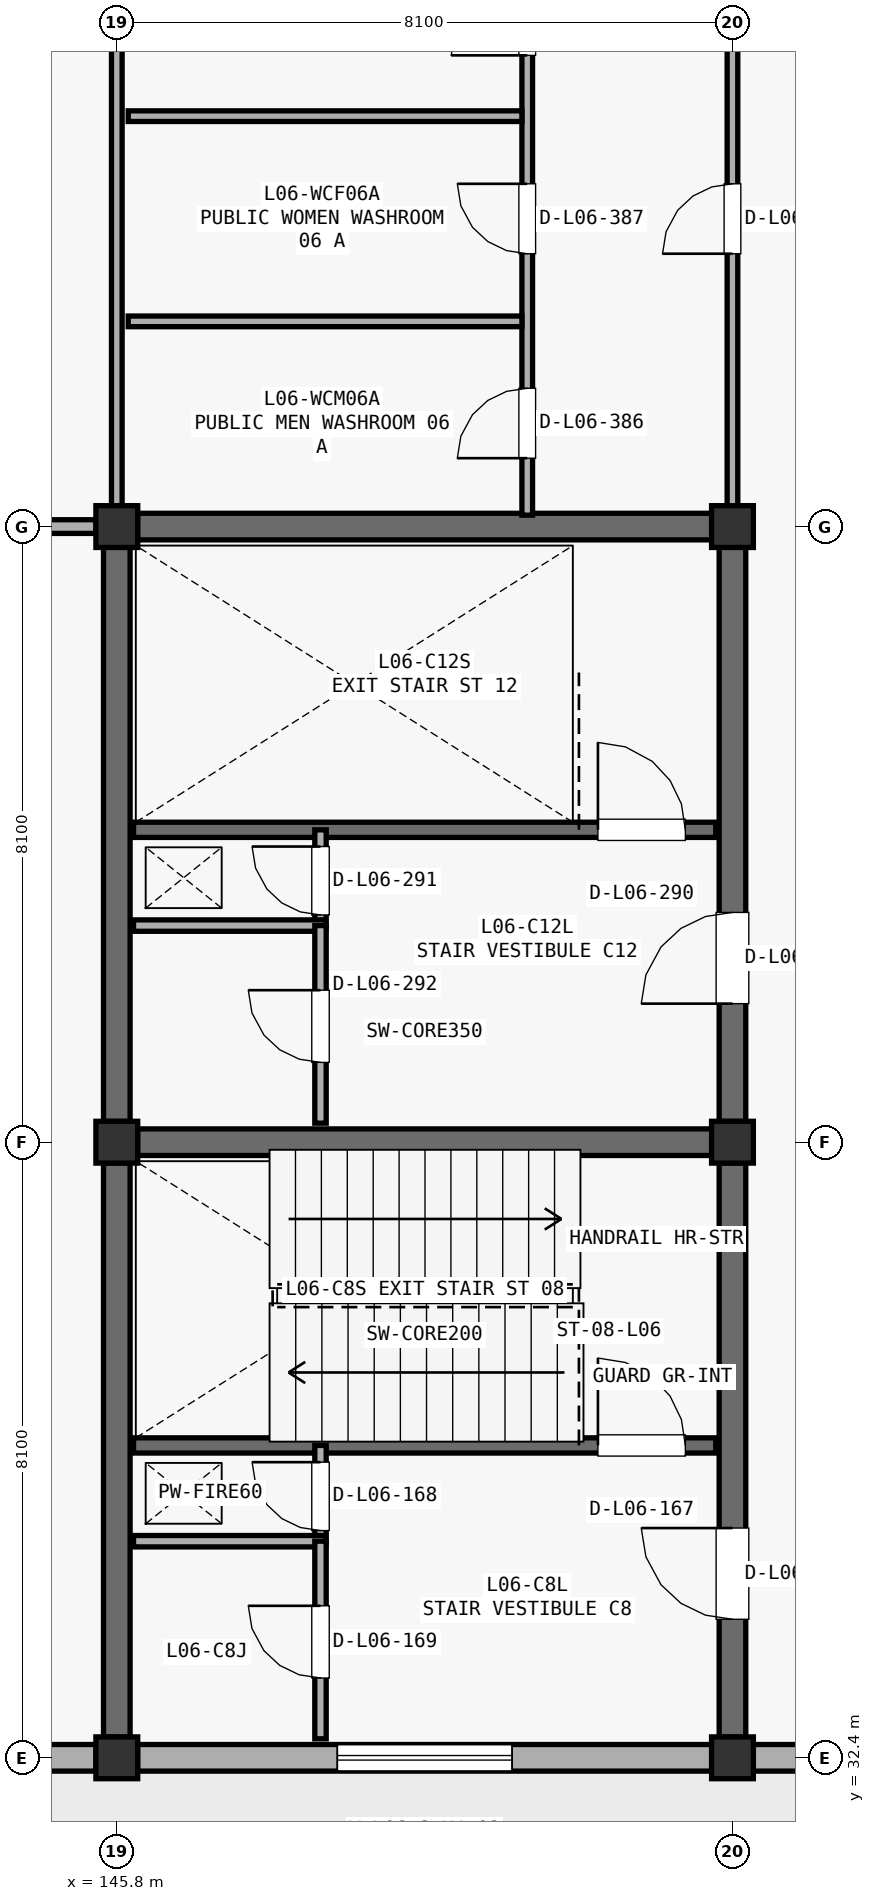
"""IFC4 building model, lengths in metres.
Left out: names, types, materials, properties, quantities, classifications, styles, units other than length and angle.
Written with IfcOpenShell. Run it as: python <this file> out.ifc"""

import sys

from ifc_helpers import new_model, si_unit, direction, frame, frame_2d, origin, origin_2d, place, context, subcontext, project, spatial, rectangle, extrude, element, fill, save


model = new_model("IFC4")
c1 = context("Model", 3, precision=1e-05, world=origin(), true_north=direction((0.0, 1.0)))
c2 = subcontext(c1, "Body", "Model", "MODEL_VIEW")
j1 = project(units=[si_unit("LENGTHUNIT", "METRE"), si_unit("PLANEANGLEUNIT", "RADIAN")], contexts=[c1])
p1 = place(None, origin())
s1 = spatial("IfcSite", under=j1, at=p1, CompositionType="ELEMENT")
p2 = place(p1, origin())
s2 = spatial("IfcBuilding", under=s1, at=p2, CompositionType="ELEMENT")
p3 = place(p2, frame((0.0, 0.0, 27.37)))
s3 = spatial("IfcBuildingStorey", under=s2, at=p3, CompositionType="ELEMENT", Elevation=27.37)
for number, where, z_axis, x_axis in (
    (1, (145.8, 32.4, 0.0), (0.0, 0.0, 1.0), (1.0, 0.0, 0.0)),
    (2, (145.8, 40.5, 0.0), (0.0, 0.0, 1.0), (1.0, 0.0, 0.0)),
    (3, (145.8, 48.6, 0.0), (0.0, 0.0, 1.0), (1.0, 0.0, 0.0)),
    (4, (153.9, 32.4, 0.0), (0.0, 0.0, 1.0), (1.0, 0.0, 0.0)),
    (5, (153.9, 40.5, 0.0), (0.0, 0.0, 1.0), (1.0, 0.0, 0.0)),
    (6, (153.9, 48.6, 0.0), (0.0, 0.0, 1.0), (1.0, 0.0, 0.0)),
):
    element("IfcColumn", number, at=place(p3, frame(where, z_axis=z_axis, x_axis=x_axis)), inside=s3, PredefinedType="COLUMN", context=c2, shape_type="SweptSolid", body=[
        extrude(rectangle(XDim=0.55, YDim=0.55, at=origin_2d()), origin(), (0.0, 0.0, 1.0), 4.42),
    ])
p4 = place(p3, frame((137.973, 32.4, 0.0), z_axis=(0.0, 0.0, 1.0), x_axis=(1.0, 0.0, 0.0)))
e7 = element("IfcWall", 7, at=p4, inside=s3, PredefinedType="STANDARD", context=c2, shape_type="SweptSolid", body=[
    extrude(rectangle(XDim=7.554, YDim=0.35, at=frame_2d((3.777, 0.0))), origin(), (0.0, 0.0, 1.0), 3.512),
])
p5 = place(p4, frame((2.752, 0.0, 0.85)))
e8 = element("IfcOpeningElement", 8, at=p5, cuts=e7, PredefinedType="OPENING", context=c2, shape_type="SweptSolid", body=[
    extrude(rectangle(XDim=2.05, YDim=1.6, at=frame_2d((1.025, 0.8))), frame((0.0, 0.185, 0.0), z_axis=(0.0, -1.0, 0.0), x_axis=(1.0, 0.0, 0.0)), (0.0, 0.0, 1.0), 0.37),
])
p6 = place(p3, frame((146.073, 32.4, 0.0), z_axis=(0.0, 0.0, 1.0), x_axis=(1.0, 0.0, 0.0)))
e9 = element("IfcWall", 9, at=p6, inside=s3, PredefinedType="STANDARD", context=c2, shape_type="SweptSolid", body=[
    extrude(rectangle(XDim=7.554, YDim=0.35, at=frame_2d((3.777, 0.0))), origin(), (0.0, 0.0, 1.0), 3.212),
])
p7 = place(p6, frame((2.627, 0.0, 0.85)))
e10 = element("IfcOpeningElement", 10, at=p7, cuts=e9, PredefinedType="OPENING", context=c2, shape_type="SweptSolid", body=[
    extrude(rectangle(XDim=2.3, YDim=1.6, at=frame_2d((1.15, 0.8))), frame((0.0, 0.185, 0.0), z_axis=(0.0, -1.0, 0.0), x_axis=(1.0, 0.0, 0.0)), (0.0, 0.0, 1.0), 0.37),
])
p8 = place(p3, frame((154.173, 32.4, 0.0), z_axis=(0.0, 0.0, 1.0), x_axis=(1.0, 0.0, 0.0)))
e11 = element("IfcWall", 11, at=p8, inside=s3, PredefinedType="STANDARD", context=c2, shape_type="SweptSolid", body=[
    extrude(rectangle(XDim=7.554, YDim=0.35, at=frame_2d((3.777, 0.0))), origin(), (0.0, 0.0, 1.0), 3.412),
])
p9 = place(p8, frame((4.677, 0.0, 0.0), z_axis=(0.0, 0.0, 1.0), x_axis=(-1.0, 0.0, 0.0)))
e12 = element("IfcOpeningElement", 12, at=p9, cuts=e11, PredefinedType="OPENING", context=c2, shape_type="SweptSolid", body=[
    extrude(rectangle(XDim=1.8, YDim=2.2, at=frame_2d((0.9, 1.1))), frame((0.0, 0.185, 0.0), z_axis=(0.0, -1.0, 0.0), x_axis=(1.0, 0.0, 0.0)), (0.0, 0.0, 1.0), 0.37),
])
for number, where, z_axis, x_axis in (
    (13, (146.073, 40.5, 0.0), (0.0, 0.0, 1.0), (1.0, 0.0, 0.0)),
    (14, (145.8, 32.673, 0.0), (0.0, 0.0, 1.0), (0.0, 1.0, 0.0)),
):
    element("IfcWall", number, at=place(p3, frame(where, z_axis=z_axis, x_axis=x_axis)), inside=s3, PredefinedType="SHEAR", context=c2, shape_type="SweptSolid", body=[
        extrude(rectangle(XDim=7.554, YDim=0.35, at=frame_2d((3.777, 0.0))), origin(), (0.0, 0.0, 1.0), 4.162),
    ])
p10 = place(p3, frame((153.9, 32.673, 0.0), z_axis=(0.0, 0.0, 1.0), x_axis=(0.0, 1.0, 0.0)))
e15 = element("IfcWall", 15, at=p10, inside=s3, PredefinedType="SHEAR", context=c2, shape_type="SweptSolid", body=[
    extrude(rectangle(XDim=7.554, YDim=0.35, at=frame_2d((3.777, 0.0))), origin(), (0.0, 0.0, 1.0), 4.162),
])
p11 = place(p10, frame((1.55, 0.0, 0.0)))
e16 = element("IfcOpeningElement", 16, at=p11, cuts=e15, PredefinedType="OPENING", context=c2, shape_type="SweptSolid", body=[
    extrude(rectangle(XDim=1.2, YDim=2.2, at=frame_2d((0.6, 1.1))), frame((0.0, 0.185, 0.0), z_axis=(0.0, -1.0, 0.0), x_axis=(1.0, 0.0, 0.0)), (0.0, 0.0, 1.0), 0.37),
])
p12 = place(p3, frame((146.02, 36.51, 0.0), z_axis=(0.0, 0.0, 1.0), x_axis=(1.0, 0.0, 0.0)))
e17 = element("IfcWall", 17, at=p12, inside=s3, PredefinedType="SHEAR", context=c2, shape_type="SweptSolid", body=[
    extrude(rectangle(XDim=7.66, YDim=0.2, at=frame_2d((3.83, 0.0))), origin(), (0.0, 0.0, 1.0), 4.162),
])
p13 = place(p12, frame((6.11, 0.0, 0.0)))
e18 = element("IfcOpeningElement", 18, at=p13, cuts=e17, PredefinedType="OPENING", context=c2, shape_type="SweptSolid", body=[
    extrude(rectangle(XDim=1.15, YDim=2.2, at=frame_2d((0.575, 1.1))), frame((0.0, 0.11, 0.0), z_axis=(0.0, -1.0, 0.0), x_axis=(1.0, 0.0, 0.0)), (0.0, 0.0, 1.0), 0.22),
])
p14 = place(p3, frame((148.48, 35.25, 0.0), z_axis=(0.0, 0.0, 1.0), x_axis=(0.0, 1.0, 0.0)))
e19 = element("IfcWall", 19, at=p14, inside=s3, PredefinedType="PARTITIONING", context=c2, shape_type="SweptSolid", body=[
    extrude(rectangle(XDim=1.26, YDim=0.15, at=frame_2d((0.63, 0.0))), origin(), (0.0, 0.0, 1.0), 4.162),
])
p15 = place(p14, frame((0.14, 0.0, 0.0)))
e20 = element("IfcOpeningElement", 20, at=p15, cuts=e19, PredefinedType="OPENING", context=c2, shape_type="SweptSolid", body=[
    extrude(rectangle(XDim=0.9, YDim=2.15, at=frame_2d((0.45, 1.075))), frame((0.0, 0.085, 0.0), z_axis=(0.0, -1.0, 0.0), x_axis=(1.0, 0.0, 0.0)), (0.0, 0.0, 1.0), 0.17),
])
p16 = place(p3, frame((146.02, 35.25, 0.0), z_axis=(0.0, 0.0, 1.0), x_axis=(1.0, 0.0, 0.0)))
e21 = element("IfcWall", 21, at=p16, inside=s3, PredefinedType="PARTITIONING", context=c2, shape_type="SweptSolid", body=[
    extrude(rectangle(XDim=2.53, YDim=0.15, at=frame_2d((1.265, 0.0))), origin(), (0.0, 0.0, 1.0), 4.162),
])
p17 = place(p3, frame((148.48, 32.65, 0.0), z_axis=(0.0, 0.0, 1.0), x_axis=(0.0, 1.0, 0.0)))
e22 = element("IfcWall", 22, at=p17, inside=s3, PredefinedType="PARTITIONING", context=c2, shape_type="SweptSolid", body=[
    extrude(rectangle(XDim=2.6, YDim=0.15, at=frame_2d((1.3, 0.0))), origin(), (0.0, 0.0, 1.0), 4.162),
])
p18 = place(p17, frame((0.8, 0.0, 0.0)))
e23 = element("IfcOpeningElement", 23, at=p18, cuts=e22, PredefinedType="OPENING", context=c2, shape_type="SweptSolid", body=[
    extrude(rectangle(XDim=0.95, YDim=2.15, at=frame_2d((0.475, 1.075))), frame((0.0, 0.085, 0.0), z_axis=(0.0, -1.0, 0.0), x_axis=(1.0, 0.0, 0.0)), (0.0, 0.0, 1.0), 0.17),
])
for number, where, z_axis, x_axis in (
    (24, (146.073, 48.6, 0.0), (0.0, 0.0, 1.0), (1.0, 0.0, 0.0)),
    (25, (145.8, 40.773, 0.0), (0.0, 0.0, 1.0), (0.0, 1.0, 0.0)),
):
    element("IfcWall", number, at=place(p3, frame(where, z_axis=z_axis, x_axis=x_axis)), inside=s3, PredefinedType="SHEAR", context=c2, shape_type="SweptSolid", body=[
        extrude(rectangle(XDim=7.554, YDim=0.35, at=frame_2d((3.777, 0.0))), origin(), (0.0, 0.0, 1.0), 4.162),
    ])
p19 = place(p3, frame((153.9, 40.773, 0.0), z_axis=(0.0, 0.0, 1.0), x_axis=(0.0, 1.0, 0.0)))
e26 = element("IfcWall", 26, at=p19, inside=s3, PredefinedType="SHEAR", context=c2, shape_type="SweptSolid", body=[
    extrude(rectangle(XDim=7.554, YDim=0.35, at=frame_2d((3.777, 0.0))), origin(), (0.0, 0.0, 1.0), 4.162),
])
p20 = place(p19, frame((1.55, 0.0, 0.0)))
e27 = element("IfcOpeningElement", 27, at=p20, cuts=e26, PredefinedType="OPENING", context=c2, shape_type="SweptSolid", body=[
    extrude(rectangle(XDim=1.2, YDim=2.2, at=frame_2d((0.6, 1.1))), frame((0.0, 0.185, 0.0), z_axis=(0.0, -1.0, 0.0), x_axis=(1.0, 0.0, 0.0)), (0.0, 0.0, 1.0), 0.37),
])
p21 = place(p3, frame((146.02, 44.61, 0.0), z_axis=(0.0, 0.0, 1.0), x_axis=(1.0, 0.0, 0.0)))
e28 = element("IfcWall", 28, at=p21, inside=s3, PredefinedType="SHEAR", context=c2, shape_type="SweptSolid", body=[
    extrude(rectangle(XDim=7.66, YDim=0.2, at=frame_2d((3.83, 0.0))), origin(), (0.0, 0.0, 1.0), 4.162),
])
p22 = place(p21, frame((6.11, 0.0, 0.0)))
e29 = element("IfcOpeningElement", 29, at=p22, cuts=e28, PredefinedType="OPENING", context=c2, shape_type="SweptSolid", body=[
    extrude(rectangle(XDim=1.15, YDim=2.2, at=frame_2d((0.575, 1.1))), frame((0.0, 0.11, 0.0), z_axis=(0.0, -1.0, 0.0), x_axis=(1.0, 0.0, 0.0)), (0.0, 0.0, 1.0), 0.22),
])
p23 = place(p3, frame((148.48, 43.35, 0.0), z_axis=(0.0, 0.0, 1.0), x_axis=(0.0, 1.0, 0.0)))
e30 = element("IfcWall", 30, at=p23, inside=s3, PredefinedType="PARTITIONING", context=c2, shape_type="SweptSolid", body=[
    extrude(rectangle(XDim=1.26, YDim=0.15, at=frame_2d((0.63, 0.0))), origin(), (0.0, 0.0, 1.0), 4.162),
])
p24 = place(p23, frame((0.14, 0.0, 0.0)))
e31 = element("IfcOpeningElement", 31, at=p24, cuts=e30, PredefinedType="OPENING", context=c2, shape_type="SweptSolid", body=[
    extrude(rectangle(XDim=0.9, YDim=2.15, at=frame_2d((0.45, 1.075))), frame((0.0, 0.085, 0.0), z_axis=(0.0, -1.0, 0.0), x_axis=(1.0, 0.0, 0.0)), (0.0, 0.0, 1.0), 0.17),
])
p25 = place(p3, frame((146.02, 43.35, 0.0), z_axis=(0.0, 0.0, 1.0), x_axis=(1.0, 0.0, 0.0)))
e32 = element("IfcWall", 32, at=p25, inside=s3, PredefinedType="PARTITIONING", context=c2, shape_type="SweptSolid", body=[
    extrude(rectangle(XDim=2.53, YDim=0.15, at=frame_2d((1.265, 0.0))), origin(), (0.0, 0.0, 1.0), 4.162),
])
p26 = place(p3, frame((148.48, 40.75, 0.0), z_axis=(0.0, 0.0, 1.0), x_axis=(0.0, 1.0, 0.0)))
e33 = element("IfcWall", 33, at=p26, inside=s3, PredefinedType="PARTITIONING", context=c2, shape_type="SweptSolid", body=[
    extrude(rectangle(XDim=2.6, YDim=0.15, at=frame_2d((1.3, 0.0))), origin(), (0.0, 0.0, 1.0), 4.162),
])
p27 = place(p26, frame((0.8, 0.0, 0.0)))
e34 = element("IfcOpeningElement", 34, at=p27, cuts=e33, PredefinedType="OPENING", context=c2, shape_type="SweptSolid", body=[
    extrude(rectangle(XDim=0.95, YDim=2.15, at=frame_2d((0.475, 1.075))), frame((0.0, 0.085, 0.0), z_axis=(0.0, -1.0, 0.0), x_axis=(1.0, 0.0, 0.0)), (0.0, 0.0, 1.0), 0.17),
])
p28 = place(p3, frame((145.8, 48.873, 0.0), z_axis=(0.0, 0.0, 1.0), x_axis=(0.0, 1.0, 0.0)))
e35 = element("IfcWall", 35, at=p28, inside=s3, PredefinedType="PARTITIONING", context=c2, shape_type="SweptSolid", body=[
    extrude(rectangle(XDim=7.554, YDim=0.14, at=frame_2d((3.777, 0.0))), origin(), (0.0, 0.0, 1.0), 3.21),
])
p29 = place(p3, frame((153.9, 48.873, 0.0), z_axis=(0.0, 0.0, 1.0), x_axis=(0.0, 1.0, 0.0)))
e36 = element("IfcWall", 36, at=p29, inside=s3, PredefinedType="PARTITIONING", context=c2, shape_type="SweptSolid", body=[
    extrude(rectangle(XDim=7.554, YDim=0.14, at=frame_2d((3.777, 0.0))), origin(), (0.0, 0.0, 1.0), 3.51),
])
p30 = place(p29, frame((3.317, 0.0, 0.0)))
e37 = element("IfcOpeningElement", 37, at=p30, cuts=e36, PredefinedType="OPENING", context=c2, shape_type="SweptSolid", body=[
    extrude(rectangle(XDim=0.92, YDim=2.15, at=frame_2d((0.46, 1.075))), frame((0.0, 0.08, 0.0), z_axis=(0.0, -1.0, 0.0), x_axis=(1.0, 0.0, 0.0)), (0.0, 0.0, 1.0), 0.16),
])
p31 = place(p3, frame((151.2, 48.75, 0.0), z_axis=(0.0, 0.0, 1.0), x_axis=(0.0, 1.0, 0.0)))
e38 = element("IfcWall", 38, at=p31, inside=s3, PredefinedType="PARTITIONING", context=c2, shape_type="SweptSolid", body=[
    extrude(rectangle(XDim=7.8, YDim=0.14, at=frame_2d((3.9, 0.0))), origin(), (0.0, 0.0, 1.0), 4.162),
])
p32 = place(p31, frame((0.75, 0.0, 0.0)))
e39 = element("IfcOpeningElement", 39, at=p32, cuts=e38, PredefinedType="OPENING", context=c2, shape_type="SweptSolid", body=[
    extrude(rectangle(XDim=0.92, YDim=2.15, at=frame_2d((0.46, 1.075))), frame((0.0, 0.08, 0.0), z_axis=(0.0, -1.0, 0.0), x_axis=(1.0, 0.0, 0.0)), (0.0, 0.0, 1.0), 0.16),
])
p33 = place(p31, frame((3.44, 0.0, 0.0)))
e40 = element("IfcOpeningElement", 40, at=p33, cuts=e38, PredefinedType="OPENING", context=c2, shape_type="SweptSolid", body=[
    extrude(rectangle(XDim=0.92, YDim=2.15, at=frame_2d((0.46, 1.075))), frame((0.0, 0.08, 0.0), z_axis=(0.0, -1.0, 0.0), x_axis=(1.0, 0.0, 0.0)), (0.0, 0.0, 1.0), 0.16),
])
p34 = place(p31, frame((6.05, 0.0, 0.0)))
e41 = element("IfcOpeningElement", 41, at=p34, cuts=e38, PredefinedType="OPENING", context=c2, shape_type="SweptSolid", body=[
    extrude(rectangle(XDim=1.0, YDim=2.15, at=frame_2d((0.5, 1.075))), frame((0.0, 0.08, 0.0), z_axis=(0.0, -1.0, 0.0), x_axis=(1.0, 0.0, 0.0)), (0.0, 0.0, 1.0), 0.16),
])
for number, where, z_axis, x_axis in (
    (42, (145.95, 51.3, 0.0), (0.0, 0.0, 1.0), (1.0, 0.0, 0.0)),
    (43, (145.95, 54.0, 0.0), (0.0, 0.0, 1.0), (1.0, 0.0, 0.0)),
):
    element("IfcWall", number, at=place(p3, frame(where, z_axis=z_axis, x_axis=x_axis)), inside=s3, PredefinedType="PARTITIONING", context=c2, shape_type="SweptSolid", body=[
        extrude(rectangle(XDim=5.18, YDim=0.14, at=frame_2d((2.59, 0.0))), origin(), (0.0, 0.0, 1.0), 4.162),
    ])
p35 = place(p3, frame((137.973, 48.6, 0.0), z_axis=(0.0, 0.0, 1.0), x_axis=(1.0, 0.0, 0.0)))
e44 = element("IfcWall", 44, at=p35, inside=s3, PredefinedType="PARTITIONING", context=c2, shape_type="SweptSolid", body=[
    extrude(rectangle(XDim=7.554, YDim=0.18, at=frame_2d((3.777, 0.0))), origin(), (0.0, 0.0, 1.0), 3.412),
])
p36 = place(p35, frame((3.237, 0.0, 0.0)))
e45 = element("IfcOpeningElement", 45, at=p36, cuts=e44, PredefinedType="OPENING", context=c2, shape_type="SweptSolid", body=[
    extrude(rectangle(XDim=1.08, YDim=2.15, at=frame_2d((0.54, 1.075))), frame((0.0, 0.1, 0.0), z_axis=(0.0, -1.0, 0.0), x_axis=(1.0, 0.0, 0.0)), (0.0, 0.0, 1.0), 0.2),
])
p37 = place(p7, origin())
e46 = element("IfcWindow", 46, at=p37, inside=s3, PartitioningType="SINGLE_PANEL", PredefinedType="WINDOW", context=c2, shape_type="SweptSolid", body=[
    extrude(rectangle(XDim=2.3, YDim=1.6, at=frame_2d((1.15, 0.8))), frame((0.0, 0.03, 0.0), z_axis=(0.0, -1.0, 0.0), x_axis=(1.0, 0.0, 0.0)), (0.0, 0.0, 1.0), 0.06),
])
fill(e10, e46)
p38 = place(p11, origin())
e47 = element("IfcDoor", 47, at=p38, inside=s3, OperationType="SINGLE_SWING_RIGHT", PredefinedType="DOOR", context=c2, shape_type="SweptSolid", body=[
    extrude(rectangle(XDim=1.2, YDim=2.2, at=frame_2d((0.6, 1.1))), frame((0.0, 0.025, 0.0), z_axis=(0.0, -1.0, 0.0), x_axis=(1.0, 0.0, 0.0)), (0.0, 0.0, 1.0), 0.05),
])
fill(e16, e47)
p39 = place(p13, origin())
e48 = element("IfcDoor", 48, at=p39, inside=s3, OperationType="SINGLE_SWING_LEFT", PredefinedType="DOOR", context=c2, shape_type="SweptSolid", body=[
    extrude(rectangle(XDim=1.15, YDim=2.2, at=frame_2d((0.575, 1.1))), frame((0.0, 0.025, 0.0), z_axis=(0.0, -1.0, 0.0), x_axis=(1.0, 0.0, 0.0)), (0.0, 0.0, 1.0), 0.05),
])
fill(e18, e48)
p40 = place(p15, origin())
e49 = element("IfcDoor", 49, at=p40, inside=s3, OperationType="SINGLE_SWING_RIGHT", PredefinedType="DOOR", context=c2, shape_type="SweptSolid", body=[
    extrude(rectangle(XDim=0.9, YDim=2.15, at=frame_2d((0.45, 1.075))), frame((0.0, 0.025, 0.0), z_axis=(0.0, -1.0, 0.0), x_axis=(1.0, 0.0, 0.0)), (0.0, 0.0, 1.0), 0.05),
])
fill(e20, e49)
p41 = place(p18, origin())
e50 = element("IfcDoor", 50, at=p41, inside=s3, OperationType="SINGLE_SWING_RIGHT", PredefinedType="DOOR", context=c2, shape_type="SweptSolid", body=[
    extrude(rectangle(XDim=0.95, YDim=2.15, at=frame_2d((0.475, 1.075))), frame((0.0, 0.025, 0.0), z_axis=(0.0, -1.0, 0.0), x_axis=(1.0, 0.0, 0.0)), (0.0, 0.0, 1.0), 0.05),
])
fill(e23, e50)
p42 = place(p20, origin())
e51 = element("IfcDoor", 51, at=p42, inside=s3, OperationType="SINGLE_SWING_LEFT", PredefinedType="DOOR", context=c2, shape_type="SweptSolid", body=[
    extrude(rectangle(XDim=1.2, YDim=2.2, at=frame_2d((0.6, 1.1))), frame((0.0, 0.025, 0.0), z_axis=(0.0, -1.0, 0.0), x_axis=(1.0, 0.0, 0.0)), (0.0, 0.0, 1.0), 0.05),
])
fill(e27, e51)
p43 = place(p22, origin())
e52 = element("IfcDoor", 52, at=p43, inside=s3, OperationType="SINGLE_SWING_LEFT", PredefinedType="DOOR", context=c2, shape_type="SweptSolid", body=[
    extrude(rectangle(XDim=1.15, YDim=2.2, at=frame_2d((0.575, 1.1))), frame((0.0, 0.025, 0.0), z_axis=(0.0, -1.0, 0.0), x_axis=(1.0, 0.0, 0.0)), (0.0, 0.0, 1.0), 0.05),
])
fill(e29, e52)
p44 = place(p24, origin())
e53 = element("IfcDoor", 53, at=p44, inside=s3, OperationType="SINGLE_SWING_RIGHT", PredefinedType="DOOR", context=c2, shape_type="SweptSolid", body=[
    extrude(rectangle(XDim=0.9, YDim=2.15, at=frame_2d((0.45, 1.075))), frame((0.0, 0.025, 0.0), z_axis=(0.0, -1.0, 0.0), x_axis=(1.0, 0.0, 0.0)), (0.0, 0.0, 1.0), 0.05),
])
fill(e31, e53)
p45 = place(p27, origin())
e54 = element("IfcDoor", 54, at=p45, inside=s3, OperationType="SINGLE_SWING_RIGHT", PredefinedType="DOOR", context=c2, shape_type="SweptSolid", body=[
    extrude(rectangle(XDim=0.95, YDim=2.15, at=frame_2d((0.475, 1.075))), frame((0.0, 0.025, 0.0), z_axis=(0.0, -1.0, 0.0), x_axis=(1.0, 0.0, 0.0)), (0.0, 0.0, 1.0), 0.05),
])
fill(e34, e54)
p46 = place(p30, origin())
e55 = element("IfcDoor", 55, at=p46, inside=s3, OperationType="SINGLE_SWING_LEFT", PredefinedType="DOOR", context=c2, shape_type="SweptSolid", body=[
    extrude(rectangle(XDim=0.92, YDim=2.15, at=frame_2d((0.46, 1.075))), frame((0.0, 0.025, 0.0), z_axis=(0.0, -1.0, 0.0), x_axis=(1.0, 0.0, 0.0)), (0.0, 0.0, 1.0), 0.05),
])
fill(e37, e55)
p47 = place(p32, origin())
e56 = element("IfcDoor", 56, at=p47, inside=s3, OperationType="SINGLE_SWING_LEFT", PredefinedType="DOOR", context=c2, shape_type="SweptSolid", body=[
    extrude(rectangle(XDim=0.92, YDim=2.15, at=frame_2d((0.46, 1.075))), frame((0.0, 0.025, 0.0), z_axis=(0.0, -1.0, 0.0), x_axis=(1.0, 0.0, 0.0)), (0.0, 0.0, 1.0), 0.05),
])
fill(e39, e56)
p48 = place(p33, origin())
e57 = element("IfcDoor", 57, at=p48, inside=s3, OperationType="SINGLE_SWING_RIGHT", PredefinedType="DOOR", context=c2, shape_type="SweptSolid", body=[
    extrude(rectangle(XDim=0.92, YDim=2.15, at=frame_2d((0.46, 1.075))), frame((0.0, 0.025, 0.0), z_axis=(0.0, -1.0, 0.0), x_axis=(1.0, 0.0, 0.0)), (0.0, 0.0, 1.0), 0.05),
])
fill(e40, e57)
p49 = place(p34, origin())
e58 = element("IfcDoor", 58, at=p49, inside=s3, OperationType="SINGLE_SWING_LEFT", PredefinedType="DOOR", context=c2, shape_type="SweptSolid", body=[
    extrude(rectangle(XDim=1.0, YDim=2.15, at=frame_2d((0.5, 1.075))), frame((0.0, 0.025, 0.0), z_axis=(0.0, -1.0, 0.0), x_axis=(1.0, 0.0, 0.0)), (0.0, 0.0, 1.0), 0.05),
])
fill(e41, e58)
save(model, sys.argv[1])
